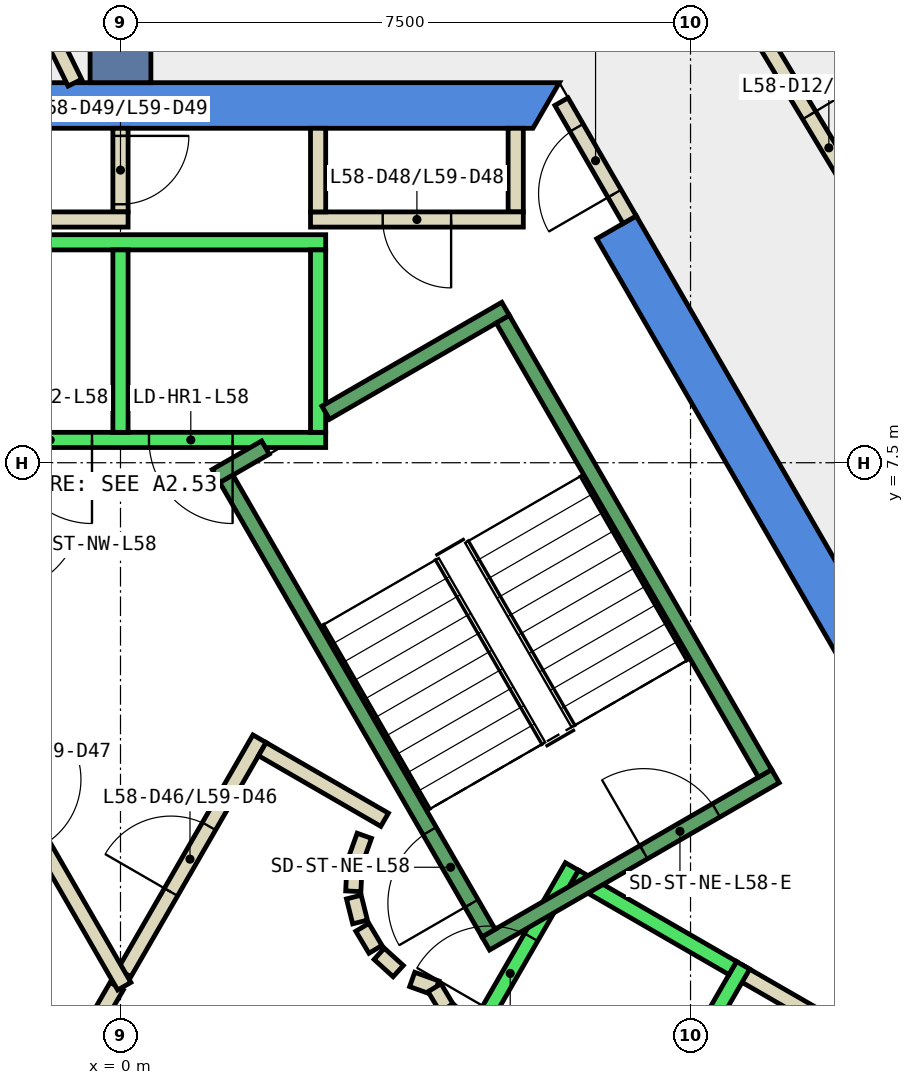
"""IFC4 building model, lengths in metres.
Left out: names, types, materials, properties, quantities, classifications, styles, units other than length and angle.
Written with IfcOpenShell. Run it as: python <this file> out.ifc"""

import sys

from ifc_helpers import new_model, si_unit, direction, frame, frame_2d, origin, place, context, subcontext, project, spatial, polyline, rectangle, outline, extrude, element, fill, save


model = new_model("IFC4")
c1 = context("Model", 3, precision=1e-05, world=origin(), true_north=direction((0.0, 1.0)))
c2 = subcontext(c1, "Body", "Model", "MODEL_VIEW")
j1 = project(units=[si_unit("LENGTHUNIT", "METRE"), si_unit("PLANEANGLEUNIT", "RADIAN")], contexts=[c1])
p1 = place(None, origin())
s1 = spatial("IfcSite", under=j1, at=p1, CompositionType="ELEMENT")
p2 = place(p1, origin())
s2 = spatial("IfcBuilding", under=s1, at=p2, CompositionType="ELEMENT")
p3 = place(p2, frame((0.0, 0.0, 255.8)))
s3 = spatial("IfcBuildingStorey", under=s2, at=p3, CompositionType="ELEMENT", Elevation=255.8)
p4 = place(p3, frame((0.0, 0.0, -0.34)))
e1 = element("IfcWall", 1, at=p4, inside=s3, PredefinedType="SHEAR", context=c2, shape_type="SweptSolid", body=[
    extrude(outline(polyline([(6.786, 10.747), (6.266, 10.447), (10.854, 2.5), (11.547, 2.5), (6.786, 10.747)])), origin(), (0.0, 0.0, 1.0), 3.6),
])
p5 = place(p3, frame((0.0, 0.0, -0.34)))
e2 = element("IfcWall", 2, at=p5, inside=s3, PredefinedType="SHEAR", context=c2, shape_type="SweptSolid", body=[
    extrude(outline(polyline([(5.774, 12.5), (-5.774, 12.5), (-5.427, 11.9), (5.427, 11.9), (5.774, 12.5)])), origin(), (0.0, 0.0, 1.0), 3.6),
])
p6 = place(p3, frame((0.0, 0.0, -0.34)))
e3 = element("IfcWall", 3, at=p6, inside=s3, PredefinedType="SHEAR", context=c2, shape_type="SweptSolid", body=[
    extrude(outline(polyline([(5.774, -7.5), (11.547, 2.5), (10.854, 2.5), (5.427, -6.9), (5.774, -7.5)])), origin(), (0.0, 0.0, 1.0), 3.6),
])
p7 = place(p3, frame((0.0, 12.5, -0.34), z_axis=(0.0, 0.0, 1.0), x_axis=(0.0, 1.0, 0.0)))
e4 = element("IfcWall", 4, at=p7, inside=s3, PredefinedType="SHEAR", context=c2, shape_type="SweptSolid", body=[
    extrude(rectangle(XDim=9.0, YDim=0.8, at=frame_2d((4.5, 0.0))), origin(), (0.0, 0.0, 1.0), 3.6),
])
p8 = place(p3, frame((-0.6, 12.5, 0.0), z_axis=(0.0, 0.0, 1.0), x_axis=(-0.440531456598, 0.897737175206, 0.0)))
e5 = element("IfcWall", 5, at=p8, inside=s3, PredefinedType="PARTITIONING", context=c2, shape_type="SweptSolid", body=[
    extrude(rectangle(XDim=1.918, YDim=0.2, at=frame_2d((0.959, 0.0))), origin(), (0.0, 0.0, 1.0), 3.26),
])
p9 = place(p3, frame((8.181, 13.532, 0.0), z_axis=(0.0, 0.0, 1.0), x_axis=(0.51625987265, -0.856431984393, 0.0)))
e6 = element("IfcWall", 6, at=p9, inside=s3, PredefinedType="PARTITIONING", context=c2, shape_type="SweptSolid", body=[
    extrude(rectangle(XDim=4.312, YDim=0.2, at=frame_2d((2.156, 0.0))), origin(), (0.0, 0.0, 1.0), 3.26),
])
p10 = place(p9, frame((1.706, 0.0, 0.0)))
e7 = element("IfcOpeningElement", 7, at=p10, cuts=e6, PredefinedType="OPENING", context=c2, shape_type="SweptSolid", body=[
    extrude(rectangle(XDim=1.0, YDim=2.1, at=frame_2d((0.5, 1.05))), frame((0.0, 0.11, 0.0), z_axis=(0.0, -1.0, 0.0), x_axis=(1.0, 0.0, 0.0)), (0.0, 0.0, 1.0), 0.22),
])
p11 = place(p3, frame((5.2, 11.9, 0.0), z_axis=(0.0, 0.0, 1.0), x_axis=(0.0, -1.0, 0.0)))
e8 = element("IfcWall", 8, at=p11, inside=s3, PredefinedType="PARTITIONING", context=c2, shape_type="SweptSolid", body=[
    extrude(rectangle(XDim=1.1, YDim=0.2, at=frame_2d((0.55, 0.0))), origin(), (0.0, 0.0, 1.0), 3.26),
])
p12 = place(p3, frame((5.3, 10.7, 0.0), z_axis=(0.0, 0.0, 1.0), x_axis=(-1.0, 0.0, 0.0)))
e9 = element("IfcWall", 9, at=p12, inside=s3, PredefinedType="PARTITIONING", context=c2, shape_type="SweptSolid", body=[
    extrude(rectangle(XDim=2.8, YDim=0.2, at=frame_2d((1.4, 0.0))), origin(), (0.0, 0.0, 1.0), 3.26),
])
p13 = place(p12, frame((0.95, 0.0, 0.0)))
e10 = element("IfcOpeningElement", 10, at=p13, cuts=e9, PredefinedType="OPENING", context=c2, shape_type="SweptSolid", body=[
    extrude(rectangle(XDim=0.9, YDim=2.1, at=frame_2d((0.45, 1.05))), frame((0.0, 0.11, 0.0), z_axis=(0.0, -1.0, 0.0), x_axis=(1.0, 0.0, 0.0)), (0.0, 0.0, 1.0), 0.22),
])
p14 = place(p3, frame((2.6, 10.8, 0.0), z_axis=(0.0, 0.0, 1.0), x_axis=(0.0, 1.0, 0.0)))
e11 = element("IfcWall", 11, at=p14, inside=s3, PredefinedType="PARTITIONING", context=c2, shape_type="SweptSolid", body=[
    extrude(rectangle(XDim=1.1, YDim=0.2, at=frame_2d((0.55, 0.0))), origin(), (0.0, 0.0, 1.0), 3.26),
])
p15 = place(p3, frame((0.0, 11.9, 0.0), z_axis=(0.0, 0.0, 1.0), x_axis=(0.0, -1.0, 0.0)))
e12 = element("IfcWall", 12, at=p15, inside=s3, PredefinedType="PARTITIONING", context=c2, shape_type="SweptSolid", body=[
    extrude(rectangle(XDim=1.1, YDim=0.2, at=frame_2d((0.55, 0.0))), origin(), (0.0, 0.0, 1.0), 3.26),
])
p16 = place(p15, frame((0.1, 0.0, 0.0)))
e13 = element("IfcOpeningElement", 13, at=p16, cuts=e12, PredefinedType="OPENING", context=c2, shape_type="SweptSolid", body=[
    extrude(rectangle(XDim=0.9, YDim=2.1, at=frame_2d((0.45, 1.05))), frame((0.0, 0.11, 0.0), z_axis=(0.0, -1.0, 0.0), x_axis=(1.0, 0.0, 0.0)), (0.0, 0.0, 1.0), 0.22),
])
p17 = place(p3, frame((0.1, 10.7, 0.0), z_axis=(0.0, 0.0, 1.0), x_axis=(-1.0, 0.0, 0.0)))
e14 = element("IfcWall", 14, at=p17, inside=s3, PredefinedType="PARTITIONING", context=c2, shape_type="SweptSolid", body=[
    extrude(rectangle(XDim=2.8, YDim=0.2, at=frame_2d((1.4, 0.0))), origin(), (0.0, 0.0, 1.0), 3.26),
])
p18 = place(p3, frame((8.141, 0.801, 0.0), z_axis=(0.0, 0.0, 1.0), x_axis=(0.866434738017, -0.499290341141, 0.0)))
e15 = element("IfcWall", 15, at=p18, inside=s3, PredefinedType="PARTITIONING", context=c2, shape_type="SweptSolid", body=[
    extrude(rectangle(XDim=1.5, YDim=0.2, at=frame_2d((0.75, 0.0))), origin(), (0.0, 0.0, 1.0), 3.26),
])
p19 = place(p3, frame((9.285, -4.818, 0.0), z_axis=(0.0, 0.0, 1.0), x_axis=(0.499962569651, 0.866047013128, 0.0)))
e16 = element("IfcWall", 16, at=p19, inside=s3, PredefinedType="PARTITIONING", context=c2, shape_type="SweptSolid", body=[
    extrude(rectangle(XDim=7.334, YDim=0.2, at=frame_2d((3.667, 0.0))), origin(), (0.0, 0.0, 1.0), 3.26),
])
p20 = place(p3, frame((-0.982, -1.0, 0.0), z_axis=(0.0, 0.0, 1.0), x_axis=(0.50024047865, 0.865886518847, 0.0)))
e17 = element("IfcWall", 17, at=p20, inside=s3, PredefinedType="PARTITIONING", context=c2, shape_type="SweptSolid", body=[
    extrude(rectangle(XDim=1.863, YDim=0.2, at=frame_2d((0.931, 0.0))), origin(), (0.0, 0.0, 1.0), 3.26),
])
p21 = place(p3, frame((0.05, 0.787, 0.0), z_axis=(0.0, 0.0, 1.0), x_axis=(0.499954076797, 0.866051915934, 0.0)))
e18 = element("IfcWall", 18, at=p21, inside=s3, PredefinedType="PARTITIONING", context=c2, shape_type="SweptSolid", body=[
    extrude(rectangle(XDim=3.558, YDim=0.2, at=frame_2d((1.779, 0.0))), origin(), (0.0, 0.0, 1.0), 3.26),
])
p22 = place(p21, frame((1.229, 0.0, 0.0)))
e19 = element("IfcOpeningElement", 19, at=p22, cuts=e18, PredefinedType="OPENING", context=c2, shape_type="SweptSolid", body=[
    extrude(rectangle(XDim=1.0, YDim=2.1, at=frame_2d((0.5, 1.05))), frame((0.0, 0.11, 0.0), z_axis=(0.0, -1.0, 0.0), x_axis=(1.0, 0.0, 0.0)), (0.0, 0.0, 1.0), 0.22),
])
p23 = place(p3, frame((1.866, 3.732, 0.0), z_axis=(0.0, 0.0, 1.0), x_axis=(0.866043361281, -0.499968895414, 0.0)))
e20 = element("IfcWall", 20, at=p23, inside=s3, PredefinedType="PARTITIONING", context=c2, shape_type="SweptSolid", body=[
    extrude(rectangle(XDim=1.858, YDim=0.2, at=frame_2d((0.929, 0.0))), origin(), (0.0, 0.0, 1.0), 3.26),
])
p24 = place(p3, frame((3.208, 2.592, 0.0), z_axis=(0.0, 0.0, 1.0), x_axis=(-0.337388820924, -0.941365382578, 0.0)))
e21 = element("IfcWall", 21, at=p24, inside=s3, PredefinedType="PARTITIONING", context=c2, shape_type="SweptSolid", body=[
    extrude(rectangle(XDim=0.338, YDim=0.2, at=frame_2d((0.169, 0.0))), origin(), (0.0, 0.0, 1.0), 3.26),
])
p25 = place(p3, frame((3.079, 2.199, 0.0), z_axis=(0.0, 0.0, 1.0), x_axis=(-0.047771483479, -0.998858290933, 0.0)))
e22 = element("IfcWall", 22, at=p25, inside=s3, PredefinedType="PARTITIONING", context=c2, shape_type="SweptSolid", body=[
    extrude(rectangle(XDim=0.337, YDim=0.2, at=frame_2d((0.169, 0.0))), origin(), (0.0, 0.0, 1.0), 3.26),
])
p26 = place(p3, frame((3.07, 1.786, 0.0), z_axis=(0.0, 0.0, 1.0), x_axis=(0.242705583207, -0.970099994784, 0.0)))
e23 = element("IfcWall", 23, at=p26, inside=s3, PredefinedType="PARTITIONING", context=c2, shape_type="SweptSolid", body=[
    extrude(rectangle(XDim=0.338, YDim=0.2, at=frame_2d((0.169, 0.0))), origin(), (0.0, 0.0, 1.0), 3.26),
])
for number, where, z_axis, x_axis in (
    (24, (3.182, 1.388, 0.0), (0.0, 0.0, 1.0), (0.512, -0.859, 0.0)),
    (25, (3.404, 1.039, 0.0), (0.0, 0.0, 1.0), (0.74, -0.672, 0.0)),
):
    element("IfcWall", number, at=place(p3, frame(where, z_axis=z_axis, x_axis=x_axis)), inside=s3, PredefinedType="PARTITIONING", context=c2, shape_type="SweptSolid", body=[
        extrude(rectangle(XDim=0.338, YDim=0.2, at=frame_2d((0.169, 0.0))), origin(), (0.0, 0.0, 1.0), 3.26),
    ])
p27 = place(p3, frame((3.838, 0.702, 0.0), z_axis=(0.0, 0.0, 1.0), x_axis=(0.941035081519, -0.338308993895, 0.0)))
e26 = element("IfcWall", 26, at=p27, inside=s3, PredefinedType="PARTITIONING", context=c2, shape_type="SweptSolid", body=[
    extrude(rectangle(XDim=0.337, YDim=0.2, at=frame_2d((0.168, 0.0))), origin(), (0.0, 0.0, 1.0), 3.26),
])
p28 = place(p3, frame((4.132, 0.593, 0.0), z_axis=(0.0, 0.0, 1.0), x_axis=(0.513561617048, -0.858052717201, 0.0)))
e27 = element("IfcWall", 27, at=p28, inside=s3, PredefinedType="PARTITIONING", context=c2, shape_type="SweptSolid", body=[
    extrude(rectangle(XDim=0.308, YDim=0.2, at=frame_2d((0.154, 0.0))), origin(), (0.0, 0.0, 1.0), 3.26),
])
p29 = place(p3, frame((4.301, 0.315, 0.0), z_axis=(0.0, 0.0, 1.0), x_axis=(0.741798017506, -0.670623367639, 0.0)))
e28 = element("IfcWall", 28, at=p29, inside=s3, PredefinedType="PARTITIONING", context=c2, shape_type="SweptSolid", body=[
    extrude(rectangle(XDim=0.309, YDim=0.2, at=frame_2d((0.154, 0.0))), origin(), (0.0, 0.0, 1.0), 3.26),
])
p30 = place(p3, frame((-2.54, 5.1, 0.0), z_axis=(0.0, 0.0, 1.0), x_axis=(0.499925051871, -0.866068670783, 0.0)))
e29 = element("IfcWall", 29, at=p30, inside=s3, PredefinedType="PARTITIONING", context=c2, shape_type="SweptSolid", body=[
    extrude(rectangle(XDim=5.181, YDim=0.2, at=frame_2d((2.59, 0.0))), origin(), (0.0, 0.0, 1.0), 3.26),
])
p31 = place(p30, frame((2.04, 0.0, 0.0)))
e30 = element("IfcOpeningElement", 30, at=p31, cuts=e29, PredefinedType="OPENING", context=c2, shape_type="SweptSolid", body=[
    extrude(rectangle(XDim=1.0, YDim=2.1, at=frame_2d((0.5, 1.05))), frame((0.0, 0.11, 0.0), z_axis=(0.0, -1.0, 0.0), x_axis=(1.0, 0.0, 0.0)), (0.0, 0.0, 1.0), 0.22),
])
p32 = place(p3, frame((6.699, 10.697, 0.0), z_axis=(0.0, 0.0, 1.0), x_axis=(-0.499914839587, 0.866074565589, 0.0)))
e31 = element("IfcWall", 31, at=p32, inside=s3, PredefinedType="PARTITIONING", context=c2, shape_type="SweptSolid", body=[
    extrude(rectangle(XDim=1.794, YDim=0.2, at=frame_2d((0.897, 0.0))), origin(), (0.0, 0.0, 1.0), 2.4),
])
p33 = place(p32, frame((0.397, 0.0, 0.0)))
e32 = element("IfcOpeningElement", 32, at=p33, cuts=e31, PredefinedType="OPENING", context=c2, shape_type="SweptSolid", body=[
    extrude(rectangle(XDim=1.0, YDim=2.1, at=frame_2d((0.5, 1.05))), frame((0.0, 0.11, 0.0), z_axis=(0.0, -1.0, 0.0), x_axis=(1.0, 0.0, 0.0)), (0.0, 0.0, 1.0), 0.22),
])
p34 = place(p3, frame((2.7, 7.8, 0.0), z_axis=(0.0, 0.0, 1.0), x_axis=(-1.0, 0.0, 0.0)))
e33 = element("IfcWall", 33, at=p34, inside=s3, PredefinedType="STANDARD", context=c2, shape_type="SweptSolid", body=[
    extrude(rectangle(XDim=5.4, YDim=0.2, at=frame_2d((2.7, 0.0))), origin(), (0.0, 0.0, 1.0), 3.26),
])
p35 = place(p34, frame((1.225, 0.0, 0.0)))
e34 = element("IfcOpeningElement", 34, at=p35, cuts=e33, PredefinedType="OPENING", context=c2, shape_type="SweptSolid", body=[
    extrude(rectangle(XDim=1.1, YDim=2.1, at=frame_2d((0.55, 1.05))), frame((0.0, 0.11, 0.0), z_axis=(0.0, -1.0, 0.0), x_axis=(1.0, 0.0, 0.0)), (0.0, 0.0, 1.0), 0.22),
])
p36 = place(p34, frame((3.075, 0.0, 0.0)))
e35 = element("IfcOpeningElement", 35, at=p36, cuts=e33, PredefinedType="OPENING", context=c2, shape_type="SweptSolid", body=[
    extrude(rectangle(XDim=1.1, YDim=2.1, at=frame_2d((0.55, 1.05))), frame((0.0, 0.11, 0.0), z_axis=(0.0, -1.0, 0.0), x_axis=(1.0, 0.0, 0.0)), (0.0, 0.0, 1.0), 0.22),
])
p37 = place(p3, frame((2.7, 10.4, 0.0), z_axis=(0.0, 0.0, 1.0), x_axis=(-1.0, 0.0, 0.0)))
e36 = element("IfcWall", 36, at=p37, inside=s3, PredefinedType="STANDARD", context=c2, shape_type="SweptSolid", body=[
    extrude(rectangle(XDim=5.4, YDim=0.2, at=frame_2d((2.7, 0.0))), origin(), (0.0, 0.0, 1.0), 3.26),
])
for number, where, z_axis, x_axis in (
    (37, (2.6, 7.9, 0.0), (0.0, 0.0, 1.0), (0.0, 1.0, 0.0)),
    (38, (0.0, 7.9, 0.0), (0.0, 0.0, 1.0), (0.0, 1.0, 0.0)),
):
    element("IfcWall", number, at=place(p3, frame(where, z_axis=z_axis, x_axis=x_axis)), inside=s3, PredefinedType="STANDARD", context=c2, shape_type="SweptSolid", body=[
        extrude(rectangle(XDim=2.4, YDim=0.2, at=frame_2d((1.2, 0.0))), origin(), (0.0, 0.0, 1.0), 3.26),
    ])
p38 = place(p3, frame((3.24, -2.488, 0.0), z_axis=(0.0, 0.0, 1.0), x_axis=(0.500034260056, 0.866005622828, 0.0)))
e39 = element("IfcWall", 39, at=p38, inside=s3, PredefinedType="STANDARD", context=c2, shape_type="SweptSolid", body=[
    extrude(rectangle(XDim=5.399, YDim=0.2, at=frame_2d((2.7, 0.0))), origin(), (0.0, 0.0, 1.0), 3.26),
])
p39 = place(p38, frame((3.225, 0.0, 0.0)))
e40 = element("IfcOpeningElement", 40, at=p39, cuts=e39, PredefinedType="OPENING", context=c2, shape_type="SweptSolid", body=[
    extrude(rectangle(XDim=1.1, YDim=2.1, at=frame_2d((0.55, 1.05))), frame((0.0, 0.11, 0.0), z_axis=(0.0, -1.0, 0.0), x_axis=(1.0, 0.0, 0.0)), (0.0, 0.0, 1.0), 0.22),
])
p40 = place(p38, frame((1.225, 0.0, 0.0)))
e41 = element("IfcOpeningElement", 41, at=p40, cuts=e39, PredefinedType="OPENING", context=c2, shape_type="SweptSolid", body=[
    extrude(rectangle(XDim=1.1, YDim=2.1, at=frame_2d((0.55, 1.05))), frame((0.0, 0.11, 0.0), z_axis=(0.0, -1.0, 0.0), x_axis=(1.0, 0.0, 0.0)), (0.0, 0.0, 1.0), 0.22),
])
p41 = place(p3, frame((5.492, -3.788, 0.0), z_axis=(0.0, 0.0, 1.0), x_axis=(0.500034260056, 0.866005622828, 0.0)))
e42 = element("IfcWall", 42, at=p41, inside=s3, PredefinedType="STANDARD", context=c2, shape_type="SweptSolid", body=[
    extrude(rectangle(XDim=5.399, YDim=0.2, at=frame_2d((2.7, 0.0))), origin(), (0.0, 0.0, 1.0), 3.26),
])
p42 = place(p3, frame((5.977, 2.052, 0.0), z_axis=(0.0, 0.0, 1.0), x_axis=(0.865973769406, -0.500089422704, 0.0)))
e43 = element("IfcWall", 43, at=p42, inside=s3, PredefinedType="STANDARD", context=c2, shape_type="SweptSolid", body=[
    extrude(rectangle(XDim=2.399, YDim=0.2, at=frame_2d((1.2, 0.0))), origin(), (0.0, 0.0, 1.0), 3.26),
])
p43 = place(p3, frame((4.806, 1.176, 0.0), z_axis=(0.0, 0.0, 1.0), x_axis=(0.866059941101, 0.499940174841, 0.0)))
e44 = element("IfcWall", 44, at=p43, inside=s3, PredefinedType="STANDARD", context=c2, shape_type="SweptSolid", body=[
    extrude(rectangle(XDim=4.4, YDim=0.2, at=frame_2d((2.2, 0.0))), origin(), (0.0, 0.0, 1.0), 3.26),
])
p44 = place(p43, frame((2.4, 0.0, 0.0)))
e45 = element("IfcOpeningElement", 45, at=p44, cuts=e44, PredefinedType="OPENING", context=c2, shape_type="SweptSolid", body=[
    extrude(rectangle(XDim=1.1, YDim=2.2, at=frame_2d((0.55, 1.1))), frame((0.0, 0.11, 0.0), z_axis=(0.0, -1.0, 0.0), x_axis=(1.0, 0.0, 0.0)), (0.0, 0.0, 1.0), 0.22),
])
p45 = place(p3, frame((2.7, 8.158, 0.0), z_axis=(0.0, 0.0, 1.0), x_axis=(0.86611865017, 0.499838457731, 0.0)))
e46 = element("IfcWall", 46, at=p45, inside=s3, PredefinedType="STANDARD", context=c2, shape_type="SweptSolid", body=[
    extrude(rectangle(XDim=2.733, YDim=0.2, at=frame_2d((1.366, 0.0))), origin(), (0.0, 0.0, 1.0), 3.26),
])
p46 = place(p3, frame((1.256, 7.324, 0.0), z_axis=(0.0, 0.0, 1.0), x_axis=(0.865915093549, 0.500191014278, 0.0)))
e47 = element("IfcWall", 47, at=p46, inside=s3, PredefinedType="STANDARD", context=c2, shape_type="SweptSolid", body=[
    extrude(rectangle(XDim=0.752, YDim=0.2, at=frame_2d((0.376, 0.0))), origin(), (0.0, 0.0, 1.0), 3.26),
])
p47 = place(p3, frame((4.843, 1.312, 0.0), z_axis=(0.0, 0.0, 1.0), x_axis=(-0.499963383562, 0.866046543262, 0.0)))
e48 = element("IfcWall", 48, at=p47, inside=s3, PredefinedType="STANDARD", context=c2, shape_type="SweptSolid", body=[
    extrude(rectangle(XDim=6.9, YDim=0.2, at=frame_2d((3.45, 0.0))), origin(), (0.0, 0.0, 1.0), 3.26),
])
p48 = place(p47, frame((0.45, 0.0, 0.0)))
e49 = element("IfcOpeningElement", 49, at=p48, cuts=e48, PredefinedType="OPENING", context=c2, shape_type="SweptSolid", body=[
    extrude(rectangle(XDim=1.1, YDim=2.2, at=frame_2d((0.55, 1.1))), frame((0.0, 0.11, 0.0), z_axis=(0.0, -1.0, 0.0), x_axis=(1.0, 0.0, 0.0)), (0.0, 0.0, 1.0), 0.22),
])
p49 = place(p3, frame((8.48, 3.412, 0.0), z_axis=(0.0, 0.0, 1.0), x_axis=(-0.499978703459, 0.866037698999, 0.0)))
e50 = element("IfcWall", 50, at=p49, inside=s3, PredefinedType="STANDARD", context=c2, shape_type="SweptSolid", body=[
    extrude(rectangle(XDim=6.9, YDim=0.2, at=frame_2d((3.45, 0.0))), origin(), (0.0, 0.0, 1.0), 3.26),
])
p50 = place(p10, origin())
e51 = element("IfcDoor", 51, at=p50, inside=s3, OperationType="SINGLE_SWING_LEFT", PredefinedType="DOOR", context=c2, shape_type="SweptSolid", body=[
    extrude(rectangle(XDim=1.0, YDim=2.1, at=frame_2d((0.5, 1.05))), frame((0.0, 0.025, 0.0), z_axis=(0.0, -1.0, 0.0), x_axis=(1.0, 0.0, 0.0)), (0.0, 0.0, 1.0), 0.05),
])
fill(e7, e51)
p51 = place(p22, origin())
e52 = element("IfcDoor", 52, at=p51, inside=s3, OperationType="SINGLE_SWING_RIGHT", PredefinedType="DOOR", context=c2, shape_type="SweptSolid", body=[
    extrude(rectangle(XDim=1.0, YDim=2.1, at=frame_2d((0.5, 1.05))), frame((0.0, 0.025, 0.0), z_axis=(0.0, -1.0, 0.0), x_axis=(1.0, 0.0, 0.0)), (0.0, 0.0, 1.0), 0.05),
])
fill(e19, e52)
p52 = place(p13, origin())
e53 = element("IfcDoor", 53, at=p52, inside=s3, OperationType="SINGLE_SWING_RIGHT", PredefinedType="DOOR", context=c2, shape_type="SweptSolid", body=[
    extrude(rectangle(XDim=0.9, YDim=2.1, at=frame_2d((0.45, 1.05))), frame((0.0, 0.025, 0.0), z_axis=(0.0, -1.0, 0.0), x_axis=(1.0, 0.0, 0.0)), (0.0, 0.0, 1.0), 0.05),
])
fill(e10, e53)
p53 = place(p16, origin())
e54 = element("IfcDoor", 54, at=p53, inside=s3, OperationType="SINGLE_SWING_LEFT", PredefinedType="DOOR", context=c2, shape_type="SweptSolid", body=[
    extrude(rectangle(XDim=0.9, YDim=2.1, at=frame_2d((0.45, 1.05))), frame((0.0, 0.025, 0.0), z_axis=(0.0, -1.0, 0.0), x_axis=(1.0, 0.0, 0.0)), (0.0, 0.0, 1.0), 0.05),
])
fill(e13, e54)
p54 = place(p33, origin())
e55 = element("IfcDoor", 55, at=p54, inside=s3, OperationType="SINGLE_SWING_LEFT", PredefinedType="DOOR", context=c2, shape_type="SweptSolid", body=[
    extrude(rectangle(XDim=1.0, YDim=2.1, at=frame_2d((0.5, 1.05))), frame((0.0, 0.025, 0.0), z_axis=(0.0, -1.0, 0.0), x_axis=(1.0, 0.0, 0.0)), (0.0, 0.0, 1.0), 0.05),
])
fill(e32, e55)
p55 = place(p35, origin())
e56 = element("IfcDoor", 56, at=p55, inside=s3, OperationType="SLIDING_TO_LEFT", PredefinedType="DOOR", context=c2, shape_type="SweptSolid", body=[
    extrude(rectangle(XDim=1.1, YDim=2.1, at=frame_2d((0.55, 1.05))), frame((0.0, 0.025, 0.0), z_axis=(0.0, -1.0, 0.0), x_axis=(1.0, 0.0, 0.0)), (0.0, 0.0, 1.0), 0.05),
])
fill(e34, e56)
p56 = place(p36, origin())
e57 = element("IfcDoor", 57, at=p56, inside=s3, OperationType="SLIDING_TO_LEFT", PredefinedType="DOOR", context=c2, shape_type="SweptSolid", body=[
    extrude(rectangle(XDim=1.1, YDim=2.1, at=frame_2d((0.55, 1.05))), frame((0.0, 0.025, 0.0), z_axis=(0.0, -1.0, 0.0), x_axis=(1.0, 0.0, 0.0)), (0.0, 0.0, 1.0), 0.05),
])
fill(e35, e57)
p57 = place(p39, origin())
e58 = element("IfcDoor", 58, at=p57, inside=s3, OperationType="SLIDING_TO_LEFT", PredefinedType="DOOR", context=c2, shape_type="SweptSolid", body=[
    extrude(rectangle(XDim=1.1, YDim=2.1, at=frame_2d((0.55, 1.05))), frame((0.0, 0.025, 0.0), z_axis=(0.0, -1.0, 0.0), x_axis=(1.0, 0.0, 0.0)), (0.0, 0.0, 1.0), 0.05),
])
fill(e40, e58)
p58 = place(p48, origin())
e59 = element("IfcDoor", 59, at=p58, inside=s3, OperationType="SINGLE_SWING_LEFT", PredefinedType="DOOR", context=c2, shape_type="SweptSolid", body=[
    extrude(rectangle(XDim=1.1, YDim=2.2, at=frame_2d((0.55, 1.1))), frame((0.0, 0.025, 0.0), z_axis=(0.0, -1.0, 0.0), x_axis=(1.0, 0.0, 0.0)), (0.0, 0.0, 1.0), 0.05),
])
fill(e49, e59)
p59 = place(p44, origin())
e60 = element("IfcDoor", 60, at=p59, inside=s3, OperationType="SINGLE_SWING_LEFT", PredefinedType="DOOR", context=c2, shape_type="SweptSolid", body=[
    extrude(rectangle(XDim=1.1, YDim=2.2, at=frame_2d((0.55, 1.1))), frame((0.0, 0.025, 0.0), z_axis=(0.0, -1.0, 0.0), x_axis=(1.0, 0.0, 0.0)), (0.0, 0.0, 1.0), 0.05),
])
fill(e45, e60)
save(model, sys.argv[1])
